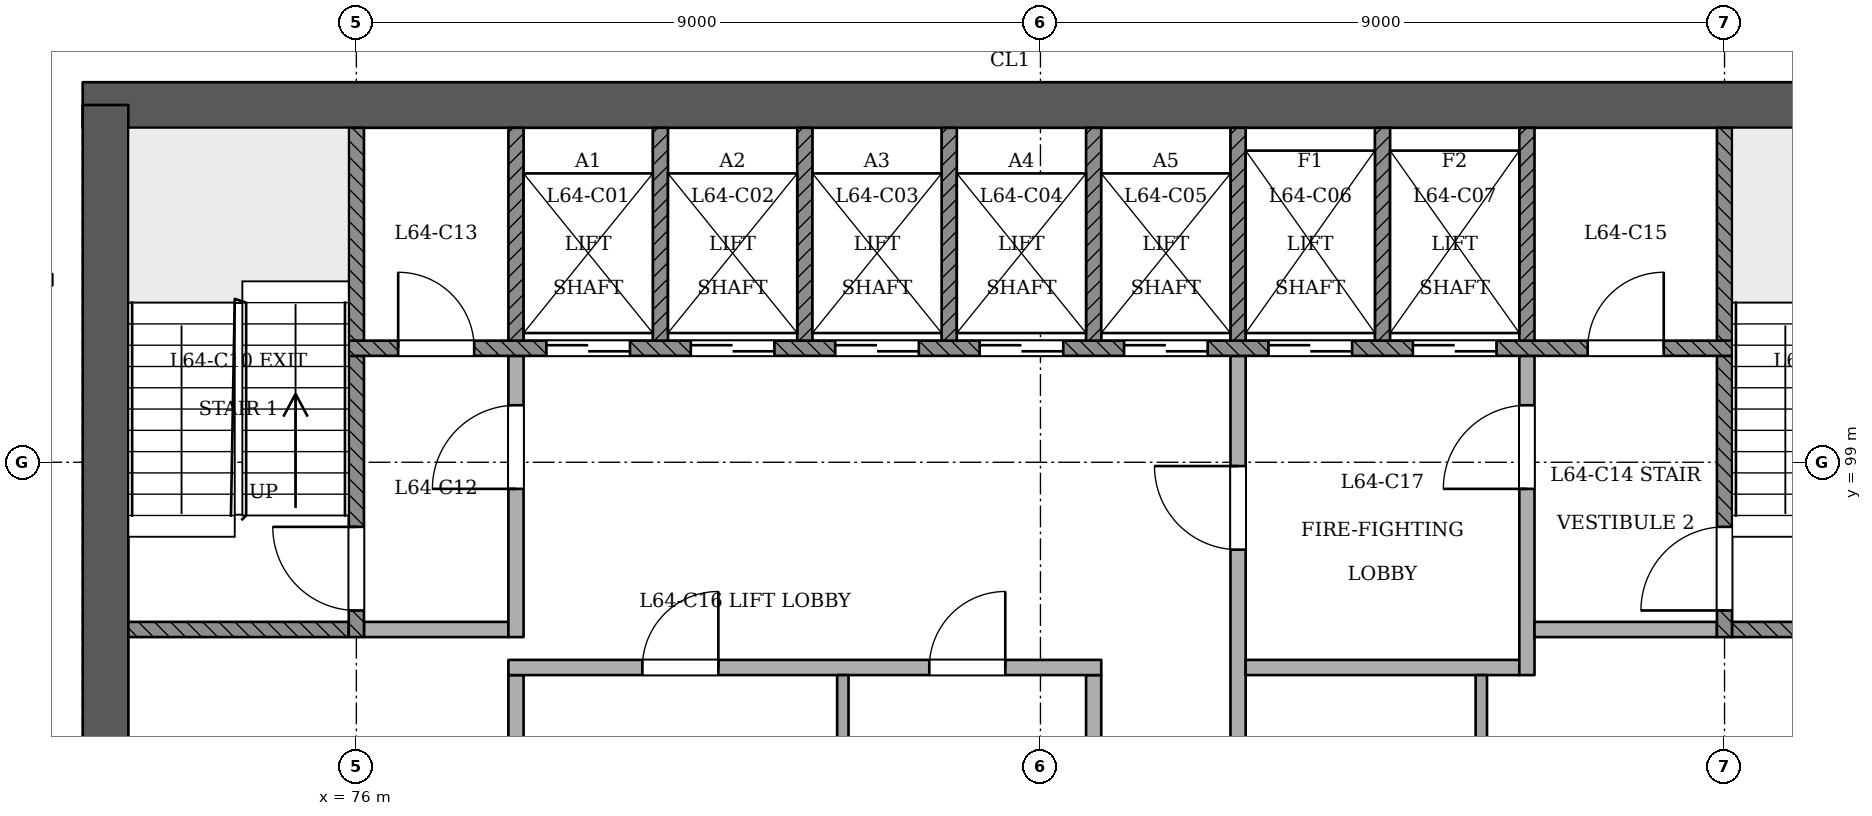
"""IFC4 building model, lengths in metres.
Left out: names, types, materials, properties, quantities, classifications, styles, units other than length and angle.
Written with IfcOpenShell. Run it as: python <this file> out.ifc"""

import sys

from ifc_helpers import new_model, si_unit, direction, frame, frame_2d, origin, place, context, subcontext, project, spatial, rectangle, extrude, element, fill, save


model = new_model("IFC4")
c1 = context("Model", 3, precision=1e-05, world=origin(), true_north=direction((0.0, 1.0)))
c2 = subcontext(c1, "Body", "Model", "MODEL_VIEW")
j1 = project(units=[si_unit("LENGTHUNIT", "METRE"), si_unit("PLANEANGLEUNIT", "RADIAN")], contexts=[c1])
p1 = place(None, origin())
s1 = spatial("IfcSite", under=j1, at=p1, CompositionType="ELEMENT")
p2 = place(p1, origin())
s2 = spatial("IfcBuilding", under=s1, at=p2, CompositionType="ELEMENT")
p3 = place(p2, frame((0.0, 0.0, 250.0)))
s3 = spatial("IfcBuildingStorey", under=s2, at=p3, CompositionType="ELEMENT", Elevation=250.0)
p4 = place(p3, frame((97.3, 103.7, 0.0), z_axis=(0.0, 0.0, 1.0), x_axis=(-1.0, 0.0, 0.0)))
e1 = element("IfcWall", 1, at=p4, inside=s3, PredefinedType="SHEAR", context=c2, shape_type="SweptSolid", body=[
    extrude(rectangle(XDim=24.9, YDim=0.6, at=frame_2d((12.45, 0.0))), origin(), (0.0, 0.0, 1.0), 3.6),
])
p5 = place(p3, frame((72.7, 103.7, 0.0), z_axis=(0.0, 0.0, 1.0), x_axis=(0.0, -1.0, 0.0)))
e2 = element("IfcWall", 2, at=p5, inside=s3, PredefinedType="SHEAR", context=c2, shape_type="SweptSolid", body=[
    extrude(rectangle(XDim=10.9, YDim=0.6, at=frame_2d((5.45, 0.0))), origin(), (0.0, 0.0, 1.0), 3.6),
])
p6 = place(p3, frame((78.1, 93.4, 0.0), z_axis=(0.0, 0.0, 1.0), x_axis=(0.0, 1.0, 0.0)))
e3 = element("IfcWall", 3, at=p6, inside=s3, PredefinedType="PARTITIONING", context=c2, shape_type="SweptSolid", body=[
    extrude(rectangle(XDim=2.8, YDim=0.2, at=frame_2d((1.4, 0.0))), origin(), (0.0, 0.0, 1.0), 3.2),
])
p7 = place(p3, frame((82.4, 93.4, 0.0), z_axis=(0.0, 0.0, 1.0), x_axis=(0.0, 1.0, 0.0)))
e4 = element("IfcWall", 4, at=p7, inside=s3, PredefinedType="PARTITIONING", context=c2, shape_type="SweptSolid", body=[
    extrude(rectangle(XDim=2.8, YDim=0.15, at=frame_2d((1.4, 0.0))), origin(), (0.0, 0.0, 1.0), 3.2),
])
p8 = place(p3, frame((85.7, 93.4, 0.0), z_axis=(0.0, 0.0, 1.0), x_axis=(0.0, 1.0, 0.0)))
e5 = element("IfcWall", 5, at=p8, inside=s3, PredefinedType="PARTITIONING", context=c2, shape_type="SweptSolid", body=[
    extrude(rectangle(XDim=2.8, YDim=0.2, at=frame_2d((1.4, 0.0))), origin(), (0.0, 0.0, 1.0), 3.2),
])
p9 = place(p3, frame((87.6, 93.4, 0.0), z_axis=(0.0, 0.0, 1.0), x_axis=(0.0, 1.0, 0.0)))
e6 = element("IfcWall", 6, at=p9, inside=s3, PredefinedType="PARTITIONING", context=c2, shape_type="SweptSolid", body=[
    extrude(rectangle(XDim=7.0, YDim=0.2, at=frame_2d((3.5, 0.0))), origin(), (0.0, 0.0, 1.0), 3.2),
])
p10 = place(p9, frame((4.45, 0.0, 0.0)))
e7 = element("IfcOpeningElement", 7, at=p10, cuts=e6, PredefinedType="OPENING", context=c2, shape_type="SweptSolid", body=[
    extrude(rectangle(XDim=1.1, YDim=2.1, at=frame_2d((0.55, 1.05))), frame((0.0, 0.11, 0.0), z_axis=(0.0, -1.0, 0.0), x_axis=(1.0, 0.0, 0.0)), (0.0, 0.0, 1.0), 0.221),
])
p11 = place(p3, frame((90.8, 93.4, 0.0), z_axis=(0.0, 0.0, 1.0), x_axis=(0.0, 1.0, 0.0)))
e8 = element("IfcWall", 8, at=p11, inside=s3, PredefinedType="PARTITIONING", context=c2, shape_type="SweptSolid", body=[
    extrude(rectangle(XDim=2.8, YDim=0.15, at=frame_2d((1.4, 0.0))), origin(), (0.0, 0.0, 1.0), 3.2),
])
p12 = place(p3, frame((78.0, 96.3, 0.0), z_axis=(0.0, 0.0, 1.0), x_axis=(1.0, 0.0, 0.0)))
e9 = element("IfcWall", 9, at=p12, inside=s3, PredefinedType="PARTITIONING", context=c2, shape_type="SweptSolid", body=[
    extrude(rectangle(XDim=7.8, YDim=0.2, at=frame_2d((3.9, 0.0))), origin(), (0.0, 0.0, 1.0), 3.2),
])
p13 = place(p12, frame((1.762, 0.0, 0.0)))
e10 = element("IfcOpeningElement", 10, at=p13, cuts=e9, PredefinedType="OPENING", context=c2, shape_type="SweptSolid", body=[
    extrude(rectangle(XDim=1.0, YDim=2.1, at=frame_2d((0.5, 1.05))), frame((0.0, 0.11, 0.0), z_axis=(0.0, -1.0, 0.0), x_axis=(1.0, 0.0, 0.0)), (0.0, 0.0, 1.0), 0.221),
])
p14 = place(p12, frame((5.538, 0.0, 0.0)))
e11 = element("IfcOpeningElement", 11, at=p14, cuts=e9, PredefinedType="OPENING", context=c2, shape_type="SweptSolid", body=[
    extrude(rectangle(XDim=1.0, YDim=2.1, at=frame_2d((0.5, 1.05))), frame((0.0, 0.11, 0.0), z_axis=(0.0, -1.0, 0.0), x_axis=(1.0, 0.0, 0.0)), (0.0, 0.0, 1.0), 0.221),
])
p15 = place(p3, frame((87.7, 96.3, 0.0), z_axis=(0.0, 0.0, 1.0), x_axis=(1.0, 0.0, 0.0)))
e12 = element("IfcWall", 12, at=p15, inside=s3, PredefinedType="PARTITIONING", context=c2, shape_type="SweptSolid", body=[
    extrude(rectangle(XDim=3.6, YDim=0.2, at=frame_2d((1.8, 0.0))), origin(), (0.0, 0.0, 1.0), 3.2),
])
p16 = place(p3, frame((91.4, 96.2, 0.0), z_axis=(0.0, 0.0, 1.0), x_axis=(0.0, 1.0, 0.0)))
e13 = element("IfcWall", 13, at=p16, inside=s3, PredefinedType="PARTITIONING", context=c2, shape_type="SweptSolid", body=[
    extrude(rectangle(XDim=4.2, YDim=0.2, at=frame_2d((2.1, 0.0))), origin(), (0.0, 0.0, 1.0), 3.2),
])
p17 = place(p16, frame((2.45, 0.0, 0.0)))
e14 = element("IfcOpeningElement", 14, at=p17, cuts=e13, PredefinedType="OPENING", context=c2, shape_type="SweptSolid", body=[
    extrude(rectangle(XDim=1.1, YDim=2.1, at=frame_2d((0.55, 1.05))), frame((0.0, 0.11, 0.0), z_axis=(0.0, -1.0, 0.0), x_axis=(1.0, 0.0, 0.0)), (0.0, 0.0, 1.0), 0.221),
])
p18 = place(p3, frame((73.0, 96.8, 0.0), z_axis=(0.0, 0.0, 1.0), x_axis=(1.0, 0.0, 0.0)))
e15 = element("IfcWall", 15, at=p18, inside=s3, PredefinedType="SOLIDWALL", context=c2, shape_type="SweptSolid", body=[
    extrude(rectangle(XDim=2.9, YDim=0.2, at=frame_2d((1.45, 0.0))), origin(), (0.0, 0.0, 1.0), 3.2),
])
p19 = place(p3, frame((76.0, 96.7, 0.0), z_axis=(0.0, 0.0, 1.0), x_axis=(0.0, 1.0, 0.0)))
e16 = element("IfcWall", 16, at=p19, inside=s3, PredefinedType="SOLIDWALL", context=c2, shape_type="SweptSolid", body=[
    extrude(rectangle(XDim=3.7, YDim=0.2, at=frame_2d((1.85, 0.0))), origin(), (0.0, 0.0, 1.0), 3.2),
])
p20 = place(p19, frame((0.35, 0.0, 0.0)))
e17 = element("IfcOpeningElement", 17, at=p20, cuts=e16, PredefinedType="OPENING", context=c2, shape_type="SweptSolid", body=[
    extrude(rectangle(XDim=1.1, YDim=2.1, at=frame_2d((0.55, 1.05))), frame((0.0, 0.11, 0.0), z_axis=(0.0, -1.0, 0.0), x_axis=(1.0, 0.0, 0.0)), (0.0, 0.0, 1.0), 0.221),
])
p21 = place(p3, frame((76.1, 96.8, 0.0), z_axis=(0.0, 0.0, 1.0), x_axis=(1.0, 0.0, 0.0)))
e18 = element("IfcWall", 18, at=p21, inside=s3, PredefinedType="PARTITIONING", context=c2, shape_type="SweptSolid", body=[
    extrude(rectangle(XDim=1.9, YDim=0.2, at=frame_2d((0.95, 0.0))), origin(), (0.0, 0.0, 1.0), 3.2),
])
p22 = place(p3, frame((78.1, 96.7, 0.0), z_axis=(0.0, 0.0, 1.0), x_axis=(0.0, 1.0, 0.0)))
e19 = element("IfcWall", 19, at=p22, inside=s3, PredefinedType="PARTITIONING", context=c2, shape_type="SweptSolid", body=[
    extrude(rectangle(XDim=3.7, YDim=0.2, at=frame_2d((1.85, 0.0))), origin(), (0.0, 0.0, 1.0), 3.2),
])
p23 = place(p22, frame((1.95, 0.0, 0.0)))
e20 = element("IfcOpeningElement", 20, at=p23, cuts=e19, PredefinedType="OPENING", context=c2, shape_type="SweptSolid", body=[
    extrude(rectangle(XDim=1.1, YDim=2.1, at=frame_2d((0.55, 1.05))), frame((0.0, 0.11, 0.0), z_axis=(0.0, -1.0, 0.0), x_axis=(1.0, 0.0, 0.0)), (0.0, 0.0, 1.0), 0.221),
])
p24 = place(p3, frame((91.5, 96.8, 0.0), z_axis=(0.0, 0.0, 1.0), x_axis=(1.0, 0.0, 0.0)))
e21 = element("IfcWall", 21, at=p24, inside=s3, PredefinedType="PARTITIONING", context=c2, shape_type="SweptSolid", body=[
    extrude(rectangle(XDim=2.4, YDim=0.2, at=frame_2d((1.2, 0.0))), origin(), (0.0, 0.0, 1.0), 3.2),
])
p25 = place(p3, frame((94.0, 96.7, 0.0), z_axis=(0.0, 0.0, 1.0), x_axis=(0.0, 1.0, 0.0)))
e22 = element("IfcWall", 22, at=p25, inside=s3, PredefinedType="SOLIDWALL", context=c2, shape_type="SweptSolid", body=[
    extrude(rectangle(XDim=3.7, YDim=0.2, at=frame_2d((1.85, 0.0))), origin(), (0.0, 0.0, 1.0), 3.2),
])
p26 = place(p25, frame((0.35, 0.0, 0.0)))
e23 = element("IfcOpeningElement", 23, at=p26, cuts=e22, PredefinedType="OPENING", context=c2, shape_type="SweptSolid", body=[
    extrude(rectangle(XDim=1.1, YDim=2.1, at=frame_2d((0.55, 1.05))), frame((0.0, 0.11, 0.0), z_axis=(0.0, -1.0, 0.0), x_axis=(1.0, 0.0, 0.0)), (0.0, 0.0, 1.0), 0.221),
])
p27 = place(p3, frame((94.1, 96.8, 0.0), z_axis=(0.0, 0.0, 1.0), x_axis=(1.0, 0.0, 0.0)))
e24 = element("IfcWall", 24, at=p27, inside=s3, PredefinedType="SOLIDWALL", context=c2, shape_type="SweptSolid", body=[
    extrude(rectangle(XDim=2.9, YDim=0.2, at=frame_2d((1.45, 0.0))), origin(), (0.0, 0.0, 1.0), 3.2),
])
p28 = place(p3, frame((75.9, 100.5, 0.0), z_axis=(0.0, 0.0, 1.0), x_axis=(1.0, 0.0, 0.0)))
e25 = element("IfcWall", 25, at=p28, inside=s3, PredefinedType="SOLIDWALL", context=c2, shape_type="SweptSolid", body=[
    extrude(rectangle(XDim=18.2, YDim=0.2, at=frame_2d((9.1, 0.0))), origin(), (0.0, 0.0, 1.0), 3.2),
])
p29 = place(p28, frame((2.6, 0.0, 0.0)))
e26 = element("IfcOpeningElement", 26, at=p29, cuts=e25, PredefinedType="OPENING", context=c2, shape_type="SweptSolid", body=[
    extrude(rectangle(XDim=1.1, YDim=2.1, at=frame_2d((0.55, 1.05))), frame((0.0, 0.11, 0.0), z_axis=(0.0, -1.0, 0.0), x_axis=(1.0, 0.0, 0.0)), (0.0, 0.0, 1.0), 0.221),
])
p30 = place(p28, frame((4.5, 0.0, 0.0)))
e27 = element("IfcOpeningElement", 27, at=p30, cuts=e25, PredefinedType="OPENING", context=c2, shape_type="SweptSolid", body=[
    extrude(rectangle(XDim=1.1, YDim=2.1, at=frame_2d((0.55, 1.05))), frame((0.0, 0.11, 0.0), z_axis=(0.0, -1.0, 0.0), x_axis=(1.0, 0.0, 0.0)), (0.0, 0.0, 1.0), 0.221),
])
p31 = place(p28, frame((6.4, 0.0, 0.0)))
e28 = element("IfcOpeningElement", 28, at=p31, cuts=e25, PredefinedType="OPENING", context=c2, shape_type="SweptSolid", body=[
    extrude(rectangle(XDim=1.1, YDim=2.1, at=frame_2d((0.55, 1.05))), frame((0.0, 0.11, 0.0), z_axis=(0.0, -1.0, 0.0), x_axis=(1.0, 0.0, 0.0)), (0.0, 0.0, 1.0), 0.221),
])
p32 = place(p28, frame((8.3, 0.0, 0.0)))
e29 = element("IfcOpeningElement", 29, at=p32, cuts=e25, PredefinedType="OPENING", context=c2, shape_type="SweptSolid", body=[
    extrude(rectangle(XDim=1.1, YDim=2.1, at=frame_2d((0.55, 1.05))), frame((0.0, 0.11, 0.0), z_axis=(0.0, -1.0, 0.0), x_axis=(1.0, 0.0, 0.0)), (0.0, 0.0, 1.0), 0.221),
])
p33 = place(p28, frame((10.2, 0.0, 0.0)))
e30 = element("IfcOpeningElement", 30, at=p33, cuts=e25, PredefinedType="OPENING", context=c2, shape_type="SweptSolid", body=[
    extrude(rectangle(XDim=1.1, YDim=2.1, at=frame_2d((0.55, 1.05))), frame((0.0, 0.11, 0.0), z_axis=(0.0, -1.0, 0.0), x_axis=(1.0, 0.0, 0.0)), (0.0, 0.0, 1.0), 0.221),
])
p34 = place(p28, frame((12.1, 0.0, 0.0)))
e31 = element("IfcOpeningElement", 31, at=p34, cuts=e25, PredefinedType="OPENING", context=c2, shape_type="SweptSolid", body=[
    extrude(rectangle(XDim=1.1, YDim=2.1, at=frame_2d((0.55, 1.05))), frame((0.0, 0.11, 0.0), z_axis=(0.0, -1.0, 0.0), x_axis=(1.0, 0.0, 0.0)), (0.0, 0.0, 1.0), 0.221),
])
p35 = place(p28, frame((14.0, 0.0, 0.0)))
e32 = element("IfcOpeningElement", 32, at=p35, cuts=e25, PredefinedType="OPENING", context=c2, shape_type="SweptSolid", body=[
    extrude(rectangle(XDim=1.1, YDim=2.1, at=frame_2d((0.55, 1.05))), frame((0.0, 0.11, 0.0), z_axis=(0.0, -1.0, 0.0), x_axis=(1.0, 0.0, 0.0)), (0.0, 0.0, 1.0), 0.221),
])
p36 = place(p28, frame((0.65, 0.0, 0.0)))
e33 = element("IfcOpeningElement", 33, at=p36, cuts=e25, PredefinedType="OPENING", context=c2, shape_type="SweptSolid", body=[
    extrude(rectangle(XDim=1.0, YDim=2.1, at=frame_2d((0.5, 1.05))), frame((0.0, 0.11, 0.0), z_axis=(0.0, -1.0, 0.0), x_axis=(1.0, 0.0, 0.0)), (0.0, 0.0, 1.0), 0.221),
])
p37 = place(p28, frame((16.3, 0.0, 0.0)))
e34 = element("IfcOpeningElement", 34, at=p37, cuts=e25, PredefinedType="OPENING", context=c2, shape_type="SweptSolid", body=[
    extrude(rectangle(XDim=1.0, YDim=2.1, at=frame_2d((0.5, 1.05))), frame((0.0, 0.11, 0.0), z_axis=(0.0, -1.0, 0.0), x_axis=(1.0, 0.0, 0.0)), (0.0, 0.0, 1.0), 0.221),
])
for number, where, z_axis, x_axis in (
    (35, (76.0, 100.6, 0.0), (0.0, 0.0, 1.0), (0.0, 1.0, 0.0)),
    (36, (78.1, 100.6, 0.0), (0.0, 0.0, 1.0), (0.0, 1.0, 0.0)),
    (37, (80.0, 100.6, 0.0), (0.0, 0.0, 1.0), (0.0, 1.0, 0.0)),
    (38, (81.9, 100.6, 0.0), (0.0, 0.0, 1.0), (0.0, 1.0, 0.0)),
    (39, (83.8, 100.6, 0.0), (0.0, 0.0, 1.0), (0.0, 1.0, 0.0)),
    (40, (85.7, 100.6, 0.0), (0.0, 0.0, 1.0), (0.0, 1.0, 0.0)),
    (41, (87.6, 100.6, 0.0), (0.0, 0.0, 1.0), (0.0, 1.0, 0.0)),
    (42, (89.5, 100.6, 0.0), (0.0, 0.0, 1.0), (0.0, 1.0, 0.0)),
    (43, (91.4, 100.6, 0.0), (0.0, 0.0, 1.0), (0.0, 1.0, 0.0)),
    (44, (94.0, 100.6, 0.0), (0.0, 0.0, 1.0), (0.0, 1.0, 0.0)),
):
    element("IfcWall", number, at=place(p3, frame(where, z_axis=z_axis, x_axis=x_axis)), inside=s3, PredefinedType="SOLIDWALL", context=c2, shape_type="SweptSolid", body=[
        extrude(rectangle(XDim=2.8, YDim=0.2, at=frame_2d((1.4, 0.0))), origin(), (0.0, 0.0, 1.0), 3.2),
    ])
p38 = place(p29, origin())
e45 = element("IfcDoor", 45, at=p38, inside=s3, OperationType="SLIDING_TO_RIGHT", PredefinedType="NOTDEFINED", context=c2, shape_type="SweptSolid", body=[
    extrude(rectangle(XDim=1.1, YDim=2.1, at=frame_2d((0.55, 1.05))), frame((0.0, 0.025, 0.0), z_axis=(0.0, -1.0, 0.0), x_axis=(1.0, 0.0, 0.0)), (0.0, 0.0, 1.0), 0.05),
])
fill(e26, e45)
p39 = place(p30, origin())
e46 = element("IfcDoor", 46, at=p39, inside=s3, OperationType="SLIDING_TO_LEFT", PredefinedType="NOTDEFINED", context=c2, shape_type="SweptSolid", body=[
    extrude(rectangle(XDim=1.1, YDim=2.1, at=frame_2d((0.55, 1.05))), frame((0.0, 0.025, 0.0), z_axis=(0.0, -1.0, 0.0), x_axis=(1.0, 0.0, 0.0)), (0.0, 0.0, 1.0), 0.05),
])
fill(e27, e46)
p40 = place(p31, origin())
e47 = element("IfcDoor", 47, at=p40, inside=s3, OperationType="SLIDING_TO_RIGHT", PredefinedType="NOTDEFINED", context=c2, shape_type="SweptSolid", body=[
    extrude(rectangle(XDim=1.1, YDim=2.1, at=frame_2d((0.55, 1.05))), frame((0.0, 0.025, 0.0), z_axis=(0.0, -1.0, 0.0), x_axis=(1.0, 0.0, 0.0)), (0.0, 0.0, 1.0), 0.05),
])
fill(e28, e47)
p41 = place(p32, origin())
e48 = element("IfcDoor", 48, at=p41, inside=s3, OperationType="SLIDING_TO_LEFT", PredefinedType="NOTDEFINED", context=c2, shape_type="SweptSolid", body=[
    extrude(rectangle(XDim=1.1, YDim=2.1, at=frame_2d((0.55, 1.05))), frame((0.0, 0.025, 0.0), z_axis=(0.0, -1.0, 0.0), x_axis=(1.0, 0.0, 0.0)), (0.0, 0.0, 1.0), 0.05),
])
fill(e29, e48)
p42 = place(p33, origin())
e49 = element("IfcDoor", 49, at=p42, inside=s3, OperationType="SLIDING_TO_RIGHT", PredefinedType="NOTDEFINED", context=c2, shape_type="SweptSolid", body=[
    extrude(rectangle(XDim=1.1, YDim=2.1, at=frame_2d((0.55, 1.05))), frame((0.0, 0.025, 0.0), z_axis=(0.0, -1.0, 0.0), x_axis=(1.0, 0.0, 0.0)), (0.0, 0.0, 1.0), 0.05),
])
fill(e30, e49)
p43 = place(p34, origin())
e50 = element("IfcDoor", 50, at=p43, inside=s3, OperationType="SLIDING_TO_RIGHT", PredefinedType="NOTDEFINED", context=c2, shape_type="SweptSolid", body=[
    extrude(rectangle(XDim=1.1, YDim=2.1, at=frame_2d((0.55, 1.05))), frame((0.0, 0.025, 0.0), z_axis=(0.0, -1.0, 0.0), x_axis=(1.0, 0.0, 0.0)), (0.0, 0.0, 1.0), 0.05),
])
fill(e31, e50)
p44 = place(p35, origin())
e51 = element("IfcDoor", 51, at=p44, inside=s3, OperationType="SLIDING_TO_LEFT", PredefinedType="NOTDEFINED", context=c2, shape_type="SweptSolid", body=[
    extrude(rectangle(XDim=1.1, YDim=2.1, at=frame_2d((0.55, 1.05))), frame((0.0, 0.025, 0.0), z_axis=(0.0, -1.0, 0.0), x_axis=(1.0, 0.0, 0.0)), (0.0, 0.0, 1.0), 0.05),
])
fill(e32, e51)
p45 = place(p20, origin())
e52 = element("IfcDoor", 52, at=p45, inside=s3, OperationType="SINGLE_SWING_RIGHT", PredefinedType="NOTDEFINED", context=c2, shape_type="SweptSolid", body=[
    extrude(rectangle(XDim=1.1, YDim=2.1, at=frame_2d((0.55, 1.05))), frame((0.0, 0.025, 0.0), z_axis=(0.0, -1.0, 0.0), x_axis=(1.0, 0.0, 0.0)), (0.0, 0.0, 1.0), 0.05),
])
fill(e17, e52)
p46 = place(p26, origin())
e53 = element("IfcDoor", 53, at=p46, inside=s3, OperationType="SINGLE_SWING_LEFT", PredefinedType="NOTDEFINED", context=c2, shape_type="SweptSolid", body=[
    extrude(rectangle(XDim=1.1, YDim=2.1, at=frame_2d((0.55, 1.05))), frame((0.0, 0.025, 0.0), z_axis=(0.0, -1.0, 0.0), x_axis=(1.0, 0.0, 0.0)), (0.0, 0.0, 1.0), 0.05),
])
fill(e23, e53)
p47 = place(p23, origin())
e54 = element("IfcDoor", 54, at=p47, inside=s3, OperationType="SINGLE_SWING_LEFT", PredefinedType="NOTDEFINED", context=c2, shape_type="SweptSolid", body=[
    extrude(rectangle(XDim=1.1, YDim=2.1, at=frame_2d((0.55, 1.05))), frame((0.0, 0.025, 0.0), z_axis=(0.0, -1.0, 0.0), x_axis=(1.0, 0.0, 0.0)), (0.0, 0.0, 1.0), 0.05),
])
fill(e20, e54)
p48 = place(p10, origin())
e55 = element("IfcDoor", 55, at=p48, inside=s3, OperationType="SINGLE_SWING_RIGHT", PredefinedType="NOTDEFINED", context=c2, shape_type="SweptSolid", body=[
    extrude(rectangle(XDim=1.1, YDim=2.1, at=frame_2d((0.55, 1.05))), frame((0.0, 0.025, 0.0), z_axis=(0.0, -1.0, 0.0), x_axis=(1.0, 0.0, 0.0)), (0.0, 0.0, 1.0), 0.05),
])
fill(e7, e55)
p49 = place(p17, origin())
e56 = element("IfcDoor", 56, at=p49, inside=s3, OperationType="SINGLE_SWING_LEFT", PredefinedType="NOTDEFINED", context=c2, shape_type="SweptSolid", body=[
    extrude(rectangle(XDim=1.1, YDim=2.1, at=frame_2d((0.55, 1.05))), frame((0.0, 0.025, 0.0), z_axis=(0.0, -1.0, 0.0), x_axis=(1.0, 0.0, 0.0)), (0.0, 0.0, 1.0), 0.05),
])
fill(e14, e56)
p50 = place(p36, origin())
e57 = element("IfcDoor", 57, at=p50, inside=s3, OperationType="SINGLE_SWING_LEFT", PredefinedType="NOTDEFINED", context=c2, shape_type="SweptSolid", body=[
    extrude(rectangle(XDim=1.0, YDim=2.1, at=frame_2d((0.5, 1.05))), frame((0.0, 0.025, 0.0), z_axis=(0.0, -1.0, 0.0), x_axis=(1.0, 0.0, 0.0)), (0.0, 0.0, 1.0), 0.05),
])
fill(e33, e57)
p51 = place(p37, origin())
e58 = element("IfcDoor", 58, at=p51, inside=s3, OperationType="SINGLE_SWING_RIGHT", PredefinedType="NOTDEFINED", context=c2, shape_type="SweptSolid", body=[
    extrude(rectangle(XDim=1.0, YDim=2.1, at=frame_2d((0.5, 1.05))), frame((0.0, 0.025, 0.0), z_axis=(0.0, -1.0, 0.0), x_axis=(1.0, 0.0, 0.0)), (0.0, 0.0, 1.0), 0.05),
])
fill(e34, e58)
p52 = place(p13, origin())
e59 = element("IfcDoor", 59, at=p52, inside=s3, OperationType="SINGLE_SWING_RIGHT", PredefinedType="NOTDEFINED", context=c2, shape_type="SweptSolid", body=[
    extrude(rectangle(XDim=1.0, YDim=2.1, at=frame_2d((0.5, 1.05))), frame((0.0, 0.025, 0.0), z_axis=(0.0, -1.0, 0.0), x_axis=(1.0, 0.0, 0.0)), (0.0, 0.0, 1.0), 0.05),
])
fill(e10, e59)
p53 = place(p14, origin())
e60 = element("IfcDoor", 60, at=p53, inside=s3, OperationType="SINGLE_SWING_RIGHT", PredefinedType="NOTDEFINED", context=c2, shape_type="SweptSolid", body=[
    extrude(rectangle(XDim=1.0, YDim=2.1, at=frame_2d((0.5, 1.05))), frame((0.0, 0.025, 0.0), z_axis=(0.0, -1.0, 0.0), x_axis=(1.0, 0.0, 0.0)), (0.0, 0.0, 1.0), 0.05),
])
fill(e11, e60)
save(model, sys.argv[1])
